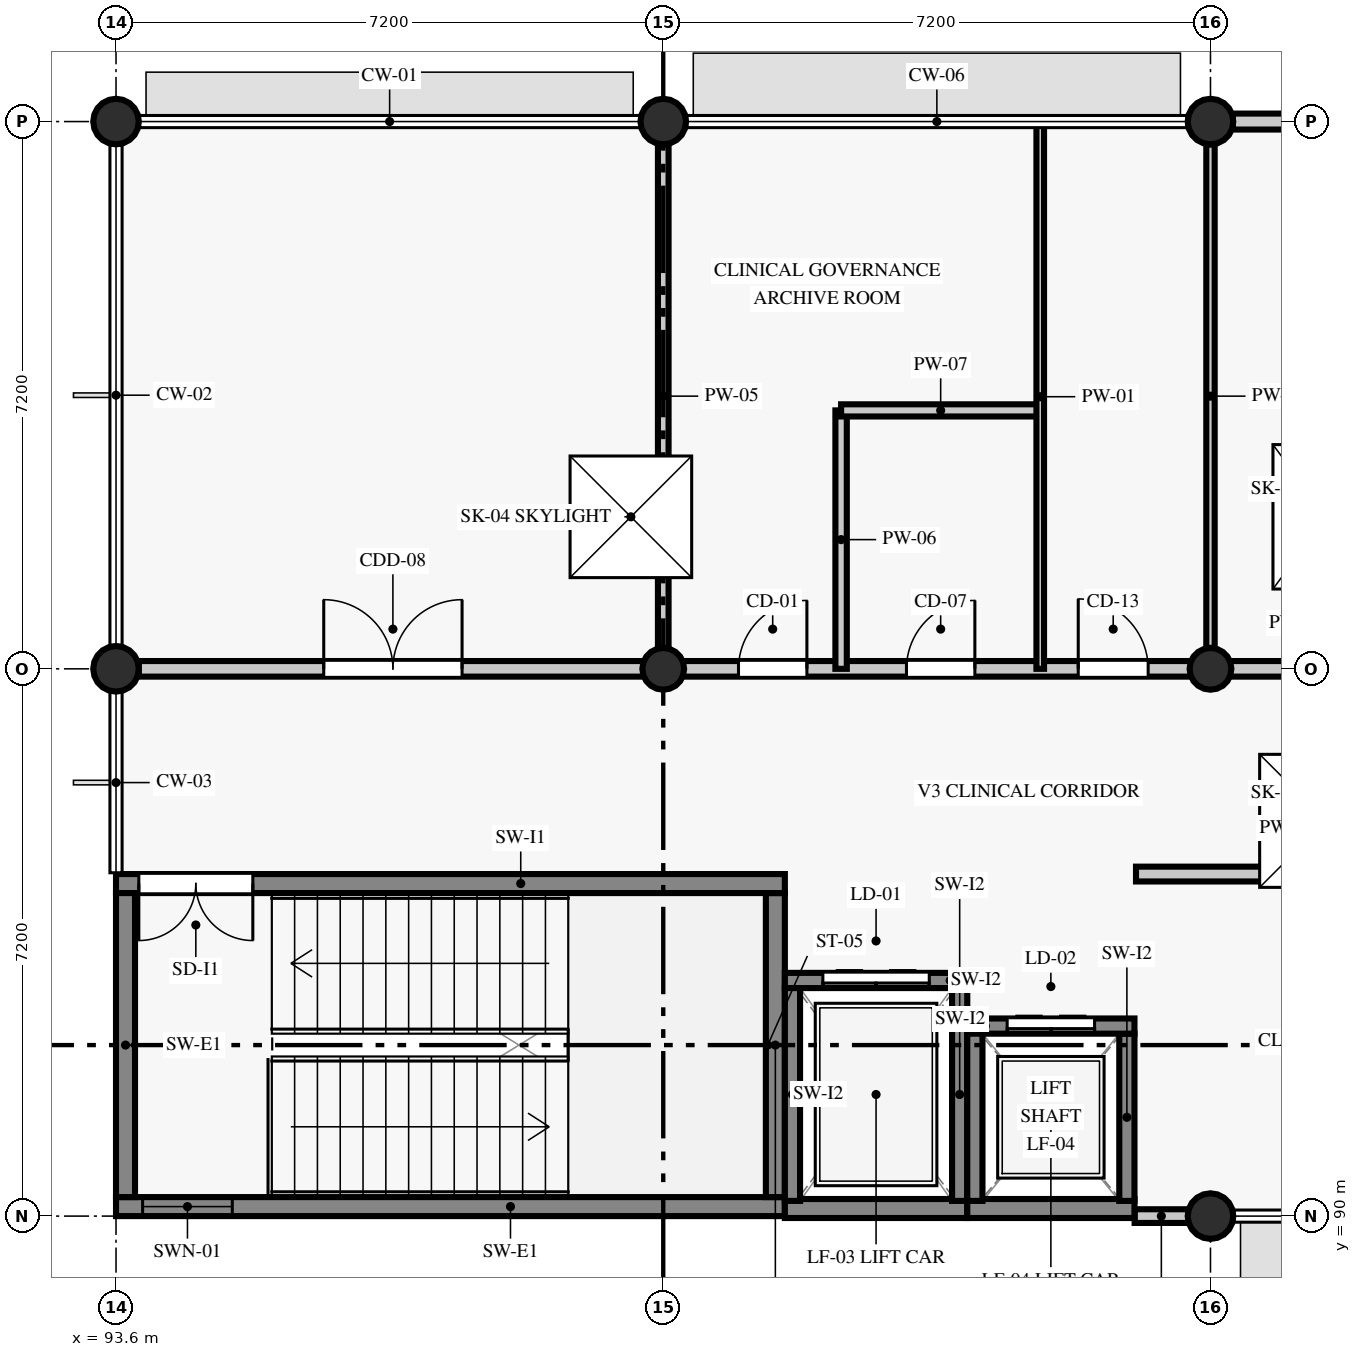
"""IFC4 building model, lengths in metres.
Left out: names, types, materials, properties, quantities, classifications, styles, units other than length and angle.
Written with IfcOpenShell. Run it as: python <this file> out.ifc"""

import sys

from ifc_helpers import new_model, si_unit, direction, frame, frame_2d, origin, origin_2d, place, context, subcontext, project, spatial, rectangle, circle, extrude, element, fill, save


model = new_model("IFC4")
c1 = context("Model", 3, precision=1e-05, world=origin(), true_north=direction((0.0, 1.0)))
c2 = subcontext(c1, "Body", "Model", "MODEL_VIEW")
j1 = project(units=[si_unit("LENGTHUNIT", "METRE"), si_unit("PLANEANGLEUNIT", "RADIAN")], contexts=[c1])
p1 = place(None, origin())
s1 = spatial("IfcSite", under=j1, at=p1, CompositionType="ELEMENT")
p2 = place(p1, origin())
s2 = spatial("IfcBuilding", under=s1, at=p2, CompositionType="ELEMENT")
p3 = place(p2, frame((0.0, 0.0, 22.2)))
s3 = spatial("IfcBuildingStorey", under=s2, at=p3, CompositionType="ELEMENT", Elevation=22.2)
for number, where, z_axis, x_axis in (
    (1, (93.6, 97.2, 0.0), (0.0, 0.0, 1.0), (1.0, 0.0, 0.0)),
    (2, (93.6, 104.4, 0.0), (0.0, 0.0, 1.0), (1.0, 0.0, 0.0)),
):
    element("IfcColumn", number, at=place(p3, frame(where, z_axis=z_axis, x_axis=x_axis)), inside=s3, PredefinedType="COLUMN", context=c2, shape_type="SweptSolid", body=[
        extrude(circle(Radius=0.3, at=origin_2d()), origin(), (0.0, 0.0, 1.0), 3.97),
    ])
p4 = place(p3, frame((100.8, 97.2, 0.0), z_axis=(0.0, 0.0, 1.0), x_axis=(1.0, 0.0, 0.0)))
e3 = element("IfcColumn", 3, at=p4, inside=s3, PredefinedType="COLUMN", context=c2, shape_type="SweptSolid", body=[
    extrude(circle(Radius=0.275, at=origin_2d()), origin(), (0.0, 0.0, 1.0), 3.97),
])
for number, where, z_axis, x_axis in (
    (4, (100.8, 104.4, 0.0), (0.0, 0.0, 1.0), (1.0, 0.0, 0.0)),
    (5, (108.0, 90.0, 0.0), (0.0, 0.0, 1.0), (1.0, 0.0, 0.0)),
):
    element("IfcColumn", number, at=place(p3, frame(where, z_axis=z_axis, x_axis=x_axis)), inside=s3, PredefinedType="COLUMN", context=c2, shape_type="SweptSolid", body=[
        extrude(circle(Radius=0.3, at=origin_2d()), origin(), (0.0, 0.0, 1.0), 3.97),
    ])
p5 = place(p3, frame((108.0, 97.2, 0.0), z_axis=(0.0, 0.0, 1.0), x_axis=(1.0, 0.0, 0.0)))
e6 = element("IfcColumn", 6, at=p5, inside=s3, PredefinedType="COLUMN", context=c2, shape_type="SweptSolid", body=[
    extrude(circle(Radius=0.275, at=origin_2d()), origin(), (0.0, 0.0, 1.0), 3.97),
])
p6 = place(p3, frame((108.0, 104.4, 0.0), z_axis=(0.0, 0.0, 1.0), x_axis=(1.0, 0.0, 0.0)))
e7 = element("IfcColumn", 7, at=p6, inside=s3, PredefinedType="COLUMN", context=c2, shape_type="SweptSolid", body=[
    extrude(circle(Radius=0.3, at=origin_2d()), origin(), (0.0, 0.0, 1.0), 3.97),
])
p7 = place(p3, frame((107.002, 90.0, 0.0), z_axis=(0.0, 0.0, 1.0), x_axis=(1.0, 0.0, 0.0)))
e8 = element("IfcWall", 8, at=p7, inside=s3, PredefinedType="STANDARD", context=c2, shape_type="SweptSolid", body=[
    extrude(rectangle(XDim=0.703, YDim=0.18, at=frame_2d((0.352, 0.0))), origin(), (0.0, 0.0, 1.0), 3.97),
])
p8 = place(p3, frame((114.905, 104.4, 0.0), z_axis=(0.0, 0.0, 1.0), x_axis=(-1.0, 0.0, 0.0)))
e9 = element("IfcWall", 9, at=p8, inside=s3, PredefinedType="STANDARD", context=c2, shape_type="SweptSolid", body=[
    extrude(rectangle(XDim=6.61, YDim=0.21, at=frame_2d((3.305, 0.0))), origin(), (0.0, 0.0, 1.0), 3.32),
])
p9 = place(p8, frame((2.38, 0.0, 0.9)))
e10 = element("IfcOpeningElement", 10, at=p9, cuts=e9, PredefinedType="OPENING", context=c2, shape_type="SweptSolid", body=[
    extrude(rectangle(XDim=1.85, YDim=1.3, at=frame_2d((0.925, 0.65))), frame((0.0, 0.115, 0.0), z_axis=(0.0, -1.0, 0.0), x_axis=(1.0, 0.0, 0.0)), (0.0, 0.0, 1.0), 0.23),
])
p10 = place(p3, frame((93.6, 90.125, 0.0), z_axis=(0.0, 0.0, 1.0), x_axis=(1.0, 0.0, 0.0)))
e11 = element("IfcWall", 11, at=p10, inside=s3, PredefinedType="SHEAR", context=c2, shape_type="SweptSolid", body=[
    extrude(rectangle(XDim=8.8, YDim=0.25, at=frame_2d((4.4, 0.0))), origin(), (0.0, 0.0, 1.0), 3.97),
])
p11 = place(p10, frame((0.35, 0.0, 0.92)))
e12 = element("IfcOpeningElement", 12, at=p11, cuts=e11, PredefinedType="OPENING", context=c2, shape_type="SweptSolid", body=[
    extrude(rectangle(XDim=1.18, YDim=1.48, at=frame_2d((0.59, 0.74))), frame((0.0, 0.135, 0.0), z_axis=(0.0, -1.0, 0.0), x_axis=(1.0, 0.0, 0.0)), (0.0, 0.0, 1.0), 0.27),
])
p12 = place(p3, frame((102.275, 90.25, 0.0), z_axis=(0.0, 0.0, 1.0), x_axis=(0.0, 1.0, 0.0)))
e13 = element("IfcWall", 13, at=p12, inside=s3, PredefinedType="SHEAR", context=c2, shape_type="SweptSolid", body=[
    extrude(rectangle(XDim=4.0, YDim=0.25, at=frame_2d((2.0, 0.0))), origin(), (0.0, 0.0, 1.0), 3.97),
])
p13 = place(p3, frame((102.4, 94.375, 0.0), z_axis=(0.0, 0.0, 1.0), x_axis=(-1.0, 0.0, 0.0)))
e14 = element("IfcWall", 14, at=p13, inside=s3, PredefinedType="SHEAR", context=c2, shape_type="SweptSolid", body=[
    extrude(rectangle(XDim=8.8, YDim=0.25, at=frame_2d((4.4, 0.0))), origin(), (0.0, 0.0, 1.0), 3.97),
])
p14 = place(p13, frame((7.0, 0.0, 0.0)))
e15 = element("IfcOpeningElement", 15, at=p14, cuts=e14, PredefinedType="OPENING", context=c2, shape_type="SweptSolid", body=[
    extrude(rectangle(XDim=1.5, YDim=2.15, at=frame_2d((0.75, 1.075))), frame((0.0, 0.135, 0.0), z_axis=(0.0, -1.0, 0.0), x_axis=(1.0, 0.0, 0.0)), (0.0, 0.0, 1.0), 0.27),
])
p15 = place(p3, frame((93.725, 94.25, 0.0), z_axis=(0.0, 0.0, 1.0), x_axis=(0.0, -1.0, 0.0)))
e16 = element("IfcWall", 16, at=p15, inside=s3, PredefinedType="SHEAR", context=c2, shape_type="SweptSolid", body=[
    extrude(rectangle(XDim=4.0, YDim=0.25, at=frame_2d((2.0, 0.0))), origin(), (0.0, 0.0, 1.0), 3.97),
])
p16 = place(p3, frame((102.4, 90.1, 0.0), z_axis=(0.0, 0.0, 1.0), x_axis=(1.0, 0.0, 0.0)))
e17 = element("IfcWall", 17, at=p16, inside=s3, PredefinedType="SHEAR", context=c2, shape_type="SweptSolid", body=[
    extrude(rectangle(XDim=2.4, YDim=0.25, at=frame_2d((1.2, 0.0))), origin(), (0.0, 0.0, 1.0), 3.97),
])
p17 = place(p3, frame((104.7, 90.2, 0.0), z_axis=(0.0, 0.0, 1.0), x_axis=(0.0, 1.0, 0.0)))
e18 = element("IfcWall", 18, at=p17, inside=s3, PredefinedType="SHEAR", context=c2, shape_type="SweptSolid", body=[
    extrude(rectangle(XDim=2.8, YDim=0.2, at=frame_2d((1.4, 0.0))), origin(), (0.0, 0.0, 1.0), 3.97),
])
p18 = place(p3, frame((104.8, 93.1, 0.0), z_axis=(0.0, 0.0, 1.0), x_axis=(-1.0, 0.0, 0.0)))
e19 = element("IfcWall", 19, at=p18, inside=s3, PredefinedType="SHEAR", context=c2, shape_type="SweptSolid", body=[
    extrude(rectangle(XDim=2.4, YDim=0.2, at=frame_2d((1.2, 0.0))), origin(), (0.0, 0.0, 1.0), 3.97),
])
p19 = place(p18, frame((0.5, 0.0, 0.0)))
e20 = element("IfcOpeningElement", 20, at=p19, cuts=e19, PredefinedType="OPENING", context=c2, shape_type="SweptSolid", body=[
    extrude(rectangle(XDim=1.4, YDim=2.15, at=frame_2d((0.7, 1.075))), frame((0.0, 0.11, 0.0), z_axis=(0.0, -1.0, 0.0), x_axis=(1.0, 0.0, 0.0)), (0.0, 0.0, 1.0), 0.22),
])
p20 = place(p3, frame((102.5, 93.0, 0.0), z_axis=(0.0, 0.0, 1.0), x_axis=(0.0, -1.0, 0.0)))
e21 = element("IfcWall", 21, at=p20, inside=s3, PredefinedType="SHEAR", context=c2, shape_type="SweptSolid", body=[
    extrude(rectangle(XDim=2.8, YDim=0.2, at=frame_2d((1.4, 0.0))), origin(), (0.0, 0.0, 1.0), 3.97),
])
p21 = place(p3, frame((104.8, 90.1, 0.0), z_axis=(0.0, 0.0, 1.0), x_axis=(1.0, 0.0, 0.0)))
e22 = element("IfcWall", 22, at=p21, inside=s3, PredefinedType="SHEAR", context=c2, shape_type="SweptSolid", body=[
    extrude(rectangle(XDim=2.2, YDim=0.25, at=frame_2d((1.1, 0.0))), origin(), (0.0, 0.0, 1.0), 3.97),
])
p22 = place(p3, frame((106.9, 90.2, 0.0), z_axis=(0.0, 0.0, 1.0), x_axis=(0.0, 1.0, 0.0)))
e23 = element("IfcWall", 23, at=p22, inside=s3, PredefinedType="SHEAR", context=c2, shape_type="SweptSolid", body=[
    extrude(rectangle(XDim=2.2, YDim=0.2, at=frame_2d((1.1, 0.0))), origin(), (0.0, 0.0, 1.0), 3.97),
])
p23 = place(p3, frame((107.0, 92.5, 0.0), z_axis=(0.0, 0.0, 1.0), x_axis=(-1.0, 0.0, 0.0)))
e24 = element("IfcWall", 24, at=p23, inside=s3, PredefinedType="SHEAR", context=c2, shape_type="SweptSolid", body=[
    extrude(rectangle(XDim=2.2, YDim=0.2, at=frame_2d((1.1, 0.0))), origin(), (0.0, 0.0, 1.0), 3.97),
])
p24 = place(p23, frame((0.525, 0.0, 0.0)))
e25 = element("IfcOpeningElement", 25, at=p24, cuts=e24, PredefinedType="OPENING", context=c2, shape_type="SweptSolid", body=[
    extrude(rectangle(XDim=1.15, YDim=2.15, at=frame_2d((0.575, 1.075))), frame((0.0, 0.11, 0.0), z_axis=(0.0, -1.0, 0.0), x_axis=(1.0, 0.0, 0.0)), (0.0, 0.0, 1.0), 0.22),
])
p25 = place(p3, frame((104.9, 92.4, 0.0), z_axis=(0.0, 0.0, 1.0), x_axis=(0.0, -1.0, 0.0)))
e26 = element("IfcWall", 26, at=p25, inside=s3, PredefinedType="SHEAR", context=c2, shape_type="SweptSolid", body=[
    extrude(rectangle(XDim=2.2, YDim=0.2, at=frame_2d((1.1, 0.0))), origin(), (0.0, 0.0, 1.0), 3.97),
])
p26 = place(p3, frame((93.9, 97.2, 0.0), z_axis=(0.0, 0.0, 1.0), x_axis=(1.0, 0.0, 0.0)))
e27 = element("IfcWall", 27, at=p26, inside=s3, PredefinedType="PARTITIONING", context=c2, shape_type="SweptSolid", body=[
    extrude(rectangle(XDim=21.0, YDim=0.205, at=frame_2d((10.5, 0.0))), origin(), (0.0, 0.0, 1.0), 3.22),
])
p27 = place(p26, frame((2.433, 0.0, 0.0)))
e28 = element("IfcOpeningElement", 28, at=p27, cuts=e27, PredefinedType="OPENING", context=c2, shape_type="SweptSolid", body=[
    extrude(rectangle(XDim=1.82, YDim=2.26, at=frame_2d((0.91, 1.13))), frame((0.0, 0.113, 0.0), z_axis=(0.0, -1.0, 0.0), x_axis=(1.0, 0.0, 0.0)), (0.0, 0.0, 1.0), 0.225),
])
p28 = place(p26, frame((7.89, 0.0, 0.0)))
e29 = element("IfcOpeningElement", 29, at=p28, cuts=e27, PredefinedType="OPENING", context=c2, shape_type="SweptSolid", body=[
    extrude(rectangle(XDim=0.9, YDim=2.08, at=frame_2d((0.45, 1.04))), frame((0.0, 0.113, 0.0), z_axis=(0.0, -1.0, 0.0), x_axis=(1.0, 0.0, 0.0)), (0.0, 0.0, 1.0), 0.225),
])
p29 = place(p26, frame((10.1, 0.0, 0.0)))
e30 = element("IfcOpeningElement", 30, at=p29, cuts=e27, PredefinedType="OPENING", context=c2, shape_type="SweptSolid", body=[
    extrude(rectangle(XDim=0.9, YDim=2.13, at=frame_2d((0.45, 1.065))), frame((0.0, 0.113, 0.0), z_axis=(0.0, -1.0, 0.0), x_axis=(1.0, 0.0, 0.0)), (0.0, 0.0, 1.0), 0.225),
])
p30 = place(p26, frame((12.36, 0.0, 0.0)))
e31 = element("IfcOpeningElement", 31, at=p30, cuts=e27, PredefinedType="OPENING", context=c2, shape_type="SweptSolid", body=[
    extrude(rectangle(XDim=0.92, YDim=2.18, at=frame_2d((0.46, 1.09))), frame((0.0, 0.113, 0.0), z_axis=(0.0, -1.0, 0.0), x_axis=(1.0, 0.0, 0.0)), (0.0, 0.0, 1.0), 0.225),
])
p31 = place(p26, frame((17.173, 0.0, 0.0)))
e32 = element("IfcOpeningElement", 32, at=p31, cuts=e27, PredefinedType="OPENING", context=c2, shape_type="SweptSolid", body=[
    extrude(rectangle(XDim=0.97, YDim=2.18, at=frame_2d((0.485, 1.09))), frame((0.0, 0.113, 0.0), z_axis=(0.0, -1.0, 0.0), x_axis=(1.0, 0.0, 0.0)), (0.0, 0.0, 1.0), 0.225),
])
p32 = place(p3, frame((100.8, 97.475, 0.0), z_axis=(0.0, 0.0, 1.0), x_axis=(0.0, 1.0, 0.0)))
e33 = element("IfcWall", 33, at=p32, inside=s3, PredefinedType="PARTITIONING", context=c2, shape_type="SweptSolid", body=[
    extrude(rectangle(XDim=6.625, YDim=0.14, at=frame_2d((3.312, 0.0))), origin(), (0.0, 0.0, 1.0), 3.42),
])
p33 = place(p3, frame((103.14, 97.2, 0.0), z_axis=(0.0, 0.0, 1.0), x_axis=(0.0, 1.0, 0.0)))
e34 = element("IfcWall", 34, at=p33, inside=s3, PredefinedType="PARTITIONING", context=c2, shape_type="SweptSolid", body=[
    extrude(rectangle(XDim=3.4, YDim=0.15, at=frame_2d((1.7, 0.0))), origin(), (0.0, 0.0, 1.0), 3.22),
])
p34 = place(p3, frame((103.14, 100.6, 0.0), z_axis=(0.0, 0.0, 1.0), x_axis=(1.0, 0.0, 0.0)))
e35 = element("IfcWall", 35, at=p34, inside=s3, PredefinedType="PARTITIONING", context=c2, shape_type="SweptSolid", body=[
    extrude(rectangle(XDim=2.62, YDim=0.16, at=frame_2d((1.31, 0.0))), origin(), (0.0, 0.0, 1.0), 3.97),
])
p35 = place(p3, frame((105.76, 97.2, 0.0), z_axis=(0.0, 0.0, 1.0), x_axis=(0.0, 1.0, 0.0)))
e36 = element("IfcWall", 36, at=p35, inside=s3, PredefinedType="PARTITIONING", context=c2, shape_type="SweptSolid", body=[
    extrude(rectangle(XDim=7.16, YDim=0.1, at=frame_2d((3.58, 0.0))), origin(), (0.0, 0.0, 1.0), 3.22),
])
p36 = place(p3, frame((108.0, 97.475, 0.0), z_axis=(0.0, 0.0, 1.0), x_axis=(0.0, 1.0, 0.0)))
e37 = element("IfcWall", 37, at=p36, inside=s3, PredefinedType="PARTITIONING", context=c2, shape_type="SweptSolid", body=[
    extrude(rectangle(XDim=6.625, YDim=0.11, at=frame_2d((3.312, 0.0))), origin(), (0.0, 0.0, 1.0), 3.42),
])
p37 = place(p3, frame((107.02, 94.5, 0.0), z_axis=(0.0, 0.0, 1.0), x_axis=(1.0, 0.0, 0.0)))
e38 = element("IfcWall", 38, at=p37, inside=s3, PredefinedType="PARTITIONING", context=c2, shape_type="SweptSolid", body=[
    extrude(rectangle(XDim=6.56, YDim=0.195, at=frame_2d((3.28, 0.0))), origin(), (0.0, 0.0, 1.0), 3.42),
])
p38 = place(p37, frame((4.005, 0.0, 0.0)))
e39 = element("IfcOpeningElement", 39, at=p38, cuts=e38, PredefinedType="OPENING", context=c2, shape_type="SweptSolid", body=[
    extrude(rectangle(XDim=1.03, YDim=2.18, at=frame_2d((0.515, 1.09))), frame((0.0, 0.107, 0.0), z_axis=(0.0, -1.0, 0.0), x_axis=(1.0, 0.0, 0.0)), (0.0, 0.0, 1.0), 0.215),
])
p39 = place(p2, frame((0.0, 0.0, 26.4)))
p40 = place(p39, frame((0.0, 0.0, -0.23)))
p41 = place(p40, frame((100.374, 99.2, 0.0)))
p42 = place(p41, frame((0.0, 0.0, 0.18)))
e40 = element("IfcWindow", 40, at=p42, inside=s3, PartitioningType="SINGLE_PANEL", PredefinedType="SKYLIGHT", context=c2, shape_type="SweptSolid", body=[
    extrude(rectangle(XDim=1.6, YDim=1.6, at=origin_2d()), origin(), (0.0, 0.0, 1.0), 0.05),
])
p43 = place(p40, frame((109.522, 95.2, 0.0)))
p44 = place(p43, frame((0.0, 0.0, 0.18)))
e41 = element("IfcWindow", 41, at=p44, inside=s3, PartitioningType="SINGLE_PANEL", PredefinedType="SKYLIGHT", context=c2, shape_type="SweptSolid", body=[
    extrude(rectangle(XDim=1.75, YDim=1.75, at=origin_2d()), origin(), (0.0, 0.0, 1.0), 0.05),
])
p45 = place(p40, frame((109.522, 99.2, 0.0)))
p46 = place(p45, frame((0.0, 0.0, 0.18)))
e42 = element("IfcWindow", 42, at=p46, inside=s3, PartitioningType="SINGLE_PANEL", PredefinedType="SKYLIGHT", context=c2, shape_type="SweptSolid", body=[
    extrude(rectangle(XDim=1.4, YDim=1.9, at=origin_2d()), origin(), (0.0, 0.0, 1.0), 0.05),
])
p47 = place(p11, origin())
e43 = element("IfcWindow", 43, at=p47, inside=s3, PartitioningType="SINGLE_PANEL", PredefinedType="WINDOW", context=c2, shape_type="SweptSolid", body=[
    extrude(rectangle(XDim=1.18, YDim=1.48, at=frame_2d((0.59, 0.74))), frame((0.0, 0.03, 0.0), z_axis=(0.0, -1.0, 0.0), x_axis=(1.0, 0.0, 0.0)), (0.0, 0.0, 1.0), 0.06),
])
fill(e12, e43)
p48 = place(p14, origin())
e44 = element("IfcDoor", 44, at=p48, inside=s3, OperationType="DOUBLE_DOOR_SINGLE_SWING", PredefinedType="DOOR", context=c2, shape_type="SweptSolid", body=[
    extrude(rectangle(XDim=1.5, YDim=2.15, at=frame_2d((0.75, 1.075))), frame((0.0, 0.025, 0.0), z_axis=(0.0, -1.0, 0.0), x_axis=(1.0, 0.0, 0.0)), (0.0, 0.0, 1.0), 0.05),
])
fill(e15, e44)
p49 = place(p19, frame((1.4, 0.0, 0.0), z_axis=(0.0, 0.0, 1.0), x_axis=(-1.0, 0.0, 0.0)))
e45 = element("IfcDoor", 45, at=p49, inside=s3, OperationType="DOUBLE_DOOR_SLIDING", PredefinedType="DOOR", context=c2, shape_type="SweptSolid", body=[
    extrude(rectangle(XDim=1.4, YDim=2.15, at=frame_2d((0.7, 1.075))), frame((0.0, 0.025, 0.0), z_axis=(0.0, -1.0, 0.0), x_axis=(1.0, 0.0, 0.0)), (0.0, 0.0, 1.0), 0.05),
])
fill(e20, e45)
p50 = place(p24, frame((1.15, 0.0, 0.0), z_axis=(0.0, 0.0, 1.0), x_axis=(-1.0, 0.0, 0.0)))
e46 = element("IfcDoor", 46, at=p50, inside=s3, OperationType="DOUBLE_DOOR_SLIDING", PredefinedType="DOOR", context=c2, shape_type="SweptSolid", body=[
    extrude(rectangle(XDim=1.15, YDim=2.15, at=frame_2d((0.575, 1.075))), frame((0.0, 0.025, 0.0), z_axis=(0.0, -1.0, 0.0), x_axis=(1.0, 0.0, 0.0)), (0.0, 0.0, 1.0), 0.05),
])
fill(e25, e46)
p51 = place(p27, origin())
e47 = element("IfcDoor", 47, at=p51, inside=s3, OperationType="DOUBLE_DOOR_SINGLE_SWING", PredefinedType="DOOR", context=c2, shape_type="SweptSolid", body=[
    extrude(rectangle(XDim=1.82, YDim=2.26, at=frame_2d((0.91, 1.13))), frame((0.0, 0.025, 0.0), z_axis=(0.0, -1.0, 0.0), x_axis=(1.0, 0.0, 0.0)), (0.0, 0.0, 1.0), 0.05),
])
fill(e28, e47)
p52 = place(p28, origin())
e48 = element("IfcDoor", 48, at=p52, inside=s3, OperationType="SINGLE_SWING_RIGHT", PredefinedType="DOOR", context=c2, shape_type="SweptSolid", body=[
    extrude(rectangle(XDim=0.9, YDim=2.08, at=frame_2d((0.45, 1.04))), frame((0.0, 0.025, 0.0), z_axis=(0.0, -1.0, 0.0), x_axis=(1.0, 0.0, 0.0)), (0.0, 0.0, 1.0), 0.05),
])
fill(e29, e48)
p53 = place(p29, origin())
e49 = element("IfcDoor", 49, at=p53, inside=s3, OperationType="SINGLE_SWING_RIGHT", PredefinedType="DOOR", context=c2, shape_type="SweptSolid", body=[
    extrude(rectangle(XDim=0.9, YDim=2.13, at=frame_2d((0.45, 1.065))), frame((0.0, 0.025, 0.0), z_axis=(0.0, -1.0, 0.0), x_axis=(1.0, 0.0, 0.0)), (0.0, 0.0, 1.0), 0.05),
])
fill(e30, e49)
p54 = place(p30, origin())
e50 = element("IfcDoor", 50, at=p54, inside=s3, OperationType="SINGLE_SWING_LEFT", PredefinedType="DOOR", context=c2, shape_type="SweptSolid", body=[
    extrude(rectangle(XDim=0.92, YDim=2.18, at=frame_2d((0.46, 1.09))), frame((0.0, 0.025, 0.0), z_axis=(0.0, -1.0, 0.0), x_axis=(1.0, 0.0, 0.0)), (0.0, 0.0, 1.0), 0.05),
])
fill(e31, e50)
save(model, sys.argv[1])
